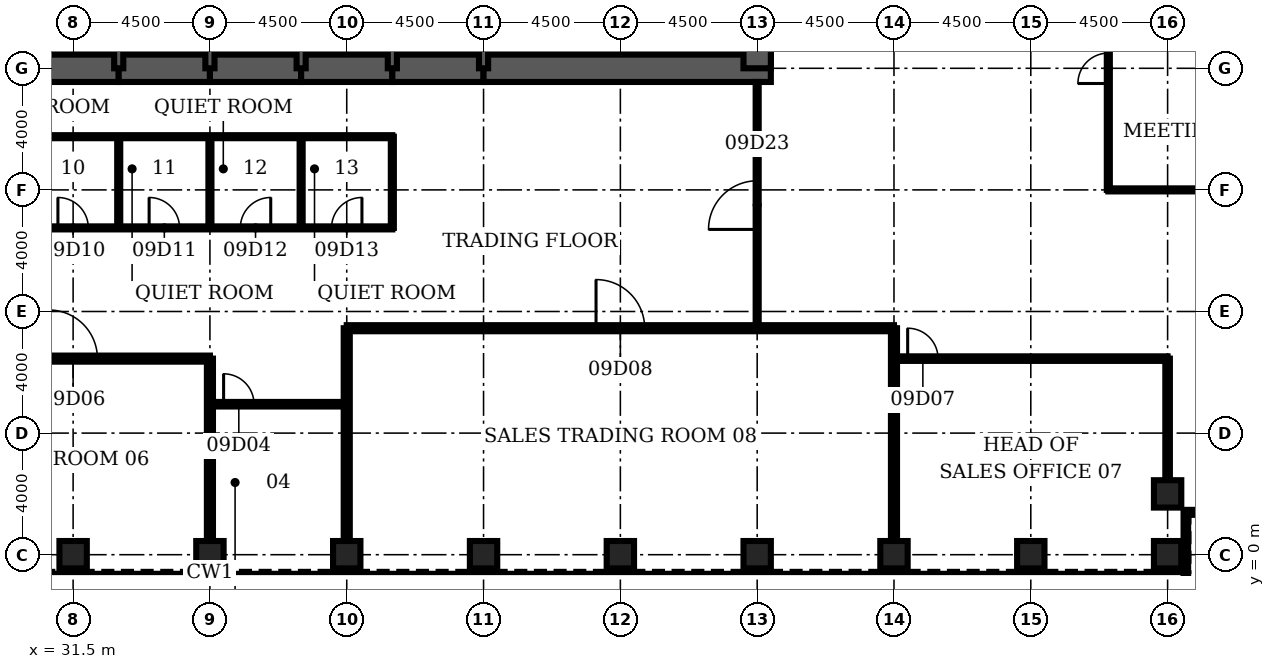
"""IFC4 building model, lengths in metres.
Left out: names, types, materials, properties, quantities, classifications, styles, units other than length and angle.
Written with IfcOpenShell. Run it as: python <this file> out.ifc"""

import sys

from ifc_helpers import new_model, si_unit, direction, frame, frame_2d, origin, origin_2d, place, context, subcontext, project, spatial, rectangle, hollow_rectangle, extrude, element, fill, save


model = new_model("IFC4")
c1 = context("Model", 3, precision=1e-05, world=origin(), true_north=direction((0.0, 1.0)))
c2 = subcontext(c1, "Body", "Model", "MODEL_VIEW")
j1 = project(units=[si_unit("LENGTHUNIT", "METRE"), si_unit("PLANEANGLEUNIT", "RADIAN")], contexts=[c1])
p1 = place(None, origin())
s1 = spatial("IfcSite", under=j1, at=p1, CompositionType="ELEMENT")
p2 = place(p1, origin())
s2 = spatial("IfcBuilding", under=s1, at=p2, CompositionType="ELEMENT")
p3 = place(p2, frame((0.0, 0.0, 45.5)))
s3 = spatial("IfcBuildingStorey", under=s2, at=p3, CompositionType="ELEMENT", Elevation=45.5)
for number, where, z_axis, x_axis in (
    (1, (31.5, 0.0, 0.0), (0.0, 0.0, 1.0), (0.0, 1.0, 0.0)),
    (2, (36.0, 0.0, 0.0), (0.0, 0.0, 1.0), (0.0, 1.0, 0.0)),
    (3, (40.5, 0.0, 0.0), (0.0, 0.0, 1.0), (0.0, 1.0, 0.0)),
    (4, (45.0, 0.0, 0.0), (0.0, 0.0, 1.0), (0.0, 1.0, 0.0)),
    (5, (49.5, 0.0, 0.0), (0.0, 0.0, 1.0), (0.0, 1.0, 0.0)),
    (6, (54.0, 0.0, 0.0), (0.0, 0.0, 1.0), (0.0, 1.0, 0.0)),
    (7, (58.5, 0.0, 0.0), (0.0, 0.0, 1.0), (0.0, 1.0, 0.0)),
    (8, (63.0, 0.0, 0.0), (0.0, 0.0, 1.0), (0.0, 1.0, 0.0)),
    (9, (67.5, 0.0, 0.0), (0.0, 0.0, 1.0), (0.0, 1.0, 0.0)),
    (10, (67.5, 2.0, 0.0), (0.0, 0.0, 1.0), (0.0, 1.0, 0.0)),
):
    element("IfcColumn", number, at=place(p3, frame(where, z_axis=z_axis, x_axis=x_axis)), inside=s3, PredefinedType="COLUMN", context=c2, shape_type="SweptSolid", body=[
        extrude(hollow_rectangle(XDim=0.9, YDim=0.9, WallThickness=0.12, at=origin_2d()), origin(), (0.0, 0.0, 1.0), 4.5),
    ])
for number, where, z_axis, x_axis in (
    (11, (30.0, 16.0, 0.0), (0.0, 0.0, 1.0), (1.0, 0.0, 0.0)),
    (12, (33.0, 16.0, 0.0), (0.0, 0.0, 1.0), (1.0, 0.0, 0.0)),
    (13, (36.0, 16.0, 0.0), (0.0, 0.0, 1.0), (1.0, 0.0, 0.0)),
    (14, (39.0, 16.0, 0.0), (0.0, 0.0, 1.0), (1.0, 0.0, 0.0)),
    (15, (42.0, 16.0, 0.0), (0.0, 0.0, 1.0), (1.0, 0.0, 0.0)),
):
    element("IfcWall", number, at=place(p3, frame(where, z_axis=z_axis, x_axis=x_axis)), inside=s3, PredefinedType="SHEAR", context=c2, shape_type="SweptSolid", body=[
        extrude(rectangle(XDim=3.0, YDim=0.9, at=frame_2d((1.5, 0.0))), origin(), (0.0, 0.0, 1.0), 4.5),
    ])
p4 = place(p3, frame((45.0, 16.0, 0.0), z_axis=(0.0, 0.0, 1.0), x_axis=(1.0, 0.0, 0.0)))
e16 = element("IfcWall", 16, at=p4, inside=s3, PredefinedType="SHEAR", context=c2, shape_type="SweptSolid", body=[
    extrude(rectangle(XDim=9.45, YDim=0.9, at=frame_2d((4.725, 0.0))), origin(), (0.0, 0.0, 1.0), 4.5),
])
p5 = place(p3, frame((54.0, 16.0, 0.0), z_axis=(0.0, 0.0, 1.0), x_axis=(0.0, 1.0, 0.0)))
e17 = element("IfcWall", 17, at=p5, inside=s3, PredefinedType="SHEAR", context=c2, shape_type="SweptSolid", body=[
    extrude(rectangle(XDim=3.2, YDim=0.9, at=frame_2d((1.6, 0.0))), origin(), (0.0, 0.0, 1.0), 4.5),
])
for number, where, z_axis, x_axis in (
    (18, (33.0, 16.0, 0.0), (0.0, 0.0, 1.0), (0.0, 1.0, 0.0)),
    (19, (36.0, 16.0, 0.0), (0.0, 0.0, 1.0), (0.0, 1.0, 0.0)),
    (20, (39.0, 16.0, 0.0), (0.0, 0.0, 1.0), (0.0, 1.0, 0.0)),
    (21, (42.0, 16.0, 0.0), (0.0, 0.0, 1.0), (0.0, 1.0, 0.0)),
    (22, (45.0, 16.0, 0.0), (0.0, 0.0, 1.0), (0.0, 1.0, 0.0)),
):
    element("IfcWall", number, at=place(p3, frame(where, z_axis=z_axis, x_axis=x_axis)), inside=s3, PredefinedType="SOLIDWALL", context=c2, shape_type="SweptSolid", body=[
        extrude(rectangle(XDim=3.2, YDim=0.3, at=frame_2d((1.6, 0.0))), origin(), (0.0, 0.0, 1.0), 4.5),
    ])
p6 = place(p3, frame((36.0, 4.95, 0.0), z_axis=(0.0, 0.0, 1.0), x_axis=(1.0, 0.0, 0.0)))
e23 = element("IfcWall", 23, at=p6, inside=s3, PredefinedType="PARTITIONING", context=c2, shape_type="SweptSolid", body=[
    extrude(rectangle(XDim=4.5, YDim=0.15, at=frame_2d((2.25, 0.0))), origin(), (0.0, 0.0, 1.0), 3.0),
])
p7 = place(p6, frame((0.45, 0.0, 0.0)))
e24 = element("IfcOpeningElement", 24, at=p7, cuts=e23, PredefinedType="OPENING", context=c2, shape_type="SweptSolid", body=[
    extrude(rectangle(XDim=1.0, YDim=2.1, at=frame_2d((0.5, 1.05))), frame((0.0, 0.085, 0.0), z_axis=(0.0, -1.0, 0.0), x_axis=(1.0, 0.0, 0.0)), (0.0, 0.0, 1.0), 0.17),
])
p8 = place(p3, frame((27.0, 6.45, 0.0), z_axis=(0.0, 0.0, 1.0), x_axis=(1.0, 0.0, 0.0)))
e25 = element("IfcWall", 25, at=p8, inside=s3, PredefinedType="PARTITIONING", context=c2, shape_type="SweptSolid", body=[
    extrude(rectangle(XDim=9.0, YDim=0.2, at=frame_2d((4.5, 0.0))), origin(), (0.0, 0.0, 1.0), 3.0),
])
p9 = place(p8, frame((3.7, 0.0, 0.0)))
e26 = element("IfcOpeningElement", 26, at=p9, cuts=e25, PredefinedType="OPENING", context=c2, shape_type="SweptSolid", body=[
    extrude(rectangle(XDim=1.6, YDim=2.1, at=frame_2d((0.8, 1.05))), frame((0.0, 0.11, 0.0), z_axis=(0.0, -1.0, 0.0), x_axis=(1.0, 0.0, 0.0)), (0.0, 0.0, 1.0), 0.22),
])
p10 = place(p3, frame((58.5, 6.45, 0.0), z_axis=(0.0, 0.0, 1.0), x_axis=(1.0, 0.0, 0.0)))
e27 = element("IfcWall", 27, at=p10, inside=s3, PredefinedType="PARTITIONING", context=c2, shape_type="SweptSolid", body=[
    extrude(rectangle(XDim=9.0, YDim=0.15, at=frame_2d((4.5, 0.0))), origin(), (0.0, 0.0, 1.0), 3.0),
])
p11 = place(p10, frame((0.45, 0.0, 0.0)))
e28 = element("IfcOpeningElement", 28, at=p11, cuts=e27, PredefinedType="OPENING", context=c2, shape_type="SweptSolid", body=[
    extrude(rectangle(XDim=1.0, YDim=2.1, at=frame_2d((0.5, 1.05))), frame((0.0, 0.085, 0.0), z_axis=(0.0, -1.0, 0.0), x_axis=(1.0, 0.0, 0.0)), (0.0, 0.0, 1.0), 0.17),
])
p12 = place(p3, frame((40.5, 7.45, 0.0), z_axis=(0.0, 0.0, 1.0), x_axis=(1.0, 0.0, 0.0)))
e29 = element("IfcWall", 29, at=p12, inside=s3, PredefinedType="PARTITIONING", context=c2, shape_type="SweptSolid", body=[
    extrude(rectangle(XDim=18.0, YDim=0.2, at=frame_2d((9.0, 0.0))), origin(), (0.0, 0.0, 1.0), 3.0),
])
p13 = place(p12, frame((8.2, 0.0, 0.0)))
e30 = element("IfcOpeningElement", 30, at=p13, cuts=e29, PredefinedType="OPENING", context=c2, shape_type="SweptSolid", body=[
    extrude(rectangle(XDim=1.6, YDim=2.1, at=frame_2d((0.8, 1.05))), frame((0.0, 0.11, 0.0), z_axis=(0.0, -1.0, 0.0), x_axis=(1.0, 0.0, 0.0)), (0.0, 0.0, 1.0), 0.22),
])
p14 = place(p3, frame((30.0, 10.75, 0.0), z_axis=(0.0, 0.0, 1.0), x_axis=(1.0, 0.0, 0.0)))
e31 = element("IfcWall", 31, at=p14, inside=s3, PredefinedType="PARTITIONING", context=c2, shape_type="SweptSolid", body=[
    extrude(rectangle(XDim=12.0, YDim=0.1, at=frame_2d((6.0, 0.0))), origin(), (0.0, 0.0, 1.0), 3.0),
])
p15 = place(p14, frame((1.0, 0.0, 0.0)))
e32 = element("IfcOpeningElement", 32, at=p15, cuts=e31, PredefinedType="OPENING", context=c2, shape_type="SweptSolid", body=[
    extrude(rectangle(XDim=1.0, YDim=2.1, at=frame_2d((0.5, 1.05))), frame((0.0, 0.06, 0.0), z_axis=(0.0, -1.0, 0.0), x_axis=(1.0, 0.0, 0.0)), (0.0, 0.0, 1.0), 0.12),
])
p16 = place(p14, frame((4.0, 0.0, 0.0)))
e33 = element("IfcOpeningElement", 33, at=p16, cuts=e31, PredefinedType="OPENING", context=c2, shape_type="SweptSolid", body=[
    extrude(rectangle(XDim=1.0, YDim=2.1, at=frame_2d((0.5, 1.05))), frame((0.0, 0.06, 0.0), z_axis=(0.0, -1.0, 0.0), x_axis=(1.0, 0.0, 0.0)), (0.0, 0.0, 1.0), 0.12),
])
p17 = place(p14, frame((7.0, 0.0, 0.0)))
e34 = element("IfcOpeningElement", 34, at=p17, cuts=e31, PredefinedType="OPENING", context=c2, shape_type="SweptSolid", body=[
    extrude(rectangle(XDim=1.0, YDim=2.1, at=frame_2d((0.5, 1.05))), frame((0.0, 0.06, 0.0), z_axis=(0.0, -1.0, 0.0), x_axis=(1.0, 0.0, 0.0)), (0.0, 0.0, 1.0), 0.12),
])
p18 = place(p14, frame((10.0, 0.0, 0.0)))
e35 = element("IfcOpeningElement", 35, at=p18, cuts=e31, PredefinedType="OPENING", context=c2, shape_type="SweptSolid", body=[
    extrude(rectangle(XDim=1.0, YDim=2.1, at=frame_2d((0.5, 1.05))), frame((0.0, 0.06, 0.0), z_axis=(0.0, -1.0, 0.0), x_axis=(1.0, 0.0, 0.0)), (0.0, 0.0, 1.0), 0.12),
])
p19 = place(p3, frame((65.55, 12.0, 0.0), z_axis=(0.0, 0.0, 1.0), x_axis=(1.0, 0.0, 0.0)))
e36 = element("IfcWall", 36, at=p19, inside=s3, PredefinedType="PARTITIONING", context=c2, shape_type="SweptSolid", body=[
    extrude(rectangle(XDim=6.0, YDim=0.1, at=frame_2d((3.0, 0.0))), origin(), (0.0, 0.0, 1.0), 3.0),
])
p20 = place(p3, frame((30.0, 13.75, 0.0), z_axis=(0.0, 0.0, 1.0), x_axis=(1.0, 0.0, 0.0)))
e37 = element("IfcWall", 37, at=p20, inside=s3, PredefinedType="PARTITIONING", context=c2, shape_type="SweptSolid", body=[
    extrude(rectangle(XDim=12.0, YDim=0.1, at=frame_2d((6.0, 0.0))), origin(), (0.0, 0.0, 1.0), 3.0),
])
p21 = place(p3, frame((33.0, 10.75, 0.0), z_axis=(0.0, 0.0, 1.0), x_axis=(0.0, 1.0, 0.0)))
e38 = element("IfcWall", 38, at=p21, inside=s3, PredefinedType="PARTITIONING", context=c2, shape_type="SweptSolid", body=[
    extrude(rectangle(XDim=3.0, YDim=0.1, at=frame_2d((1.5, 0.0))), origin(), (0.0, 0.0, 1.0), 3.0),
])
p22 = place(p3, frame((36.0, 0.45, 0.0), z_axis=(0.0, 0.0, 1.0), x_axis=(0.0, 1.0, 0.0)))
e39 = element("IfcWall", 39, at=p22, inside=s3, PredefinedType="PARTITIONING", context=c2, shape_type="SweptSolid", body=[
    extrude(rectangle(XDim=6.0, YDim=0.2, at=frame_2d((3.0, 0.0))), origin(), (0.0, 0.0, 1.0), 3.0),
])
for number, where, z_axis, x_axis in (
    (40, (36.0, 10.75, 0.0), (0.0, 0.0, 1.0), (0.0, 1.0, 0.0)),
    (41, (39.0, 10.75, 0.0), (0.0, 0.0, 1.0), (0.0, 1.0, 0.0)),
):
    element("IfcWall", number, at=place(p3, frame(where, z_axis=z_axis, x_axis=x_axis)), inside=s3, PredefinedType="PARTITIONING", context=c2, shape_type="SweptSolid", body=[
        extrude(rectangle(XDim=3.0, YDim=0.1, at=frame_2d((1.5, 0.0))), origin(), (0.0, 0.0, 1.0), 3.0),
    ])
p23 = place(p3, frame((40.5, 0.45, 0.0), z_axis=(0.0, 0.0, 1.0), x_axis=(0.0, 1.0, 0.0)))
e42 = element("IfcWall", 42, at=p23, inside=s3, PredefinedType="PARTITIONING", context=c2, shape_type="SweptSolid", body=[
    extrude(rectangle(XDim=7.0, YDim=0.2, at=frame_2d((3.5, 0.0))), origin(), (0.0, 0.0, 1.0), 3.0),
])
p24 = place(p3, frame((42.0, 10.75, 0.0), z_axis=(0.0, 0.0, 1.0), x_axis=(0.0, 1.0, 0.0)))
e43 = element("IfcWall", 43, at=p24, inside=s3, PredefinedType="PARTITIONING", context=c2, shape_type="SweptSolid", body=[
    extrude(rectangle(XDim=3.0, YDim=0.1, at=frame_2d((1.5, 0.0))), origin(), (0.0, 0.0, 1.0), 3.0),
])
p25 = place(p3, frame((54.0, 7.45, 0.0), z_axis=(0.0, 0.0, 1.0), x_axis=(0.0, 1.0, 0.0)))
e44 = element("IfcWall", 44, at=p25, inside=s3, PredefinedType="PARTITIONING", context=c2, shape_type="SweptSolid", body=[
    extrude(rectangle(XDim=8.1, YDim=0.1, at=frame_2d((4.05, 0.0))), origin(), (0.0, 0.0, 1.0), 3.0),
])
p26 = place(p25, frame((3.25, 0.0, 0.0)))
e45 = element("IfcOpeningElement", 45, at=p26, cuts=e44, PredefinedType="OPENING", context=c2, shape_type="SweptSolid", body=[
    extrude(rectangle(XDim=1.6, YDim=2.1, at=frame_2d((0.8, 1.05))), frame((0.0, 0.06, 0.0), z_axis=(0.0, -1.0, 0.0), x_axis=(1.0, 0.0, 0.0)), (0.0, 0.0, 1.0), 0.12),
])
p27 = place(p3, frame((58.5, 0.45, 0.0), z_axis=(0.0, 0.0, 1.0), x_axis=(0.0, 1.0, 0.0)))
e46 = element("IfcWall", 46, at=p27, inside=s3, PredefinedType="PARTITIONING", context=c2, shape_type="SweptSolid", body=[
    extrude(rectangle(XDim=7.0, YDim=0.2, at=frame_2d((3.5, 0.0))), origin(), (0.0, 0.0, 1.0), 3.0),
])
p28 = place(p3, frame((65.55, 12.0, 0.0), z_axis=(0.0, 0.0, 1.0), x_axis=(0.0, 1.0, 0.0)))
e47 = element("IfcWall", 47, at=p28, inside=s3, PredefinedType="PARTITIONING", context=c2, shape_type="SweptSolid", body=[
    extrude(rectangle(XDim=8.0, YDim=0.1, at=frame_2d((4.0, 0.0))), origin(), (0.0, 0.0, 1.0), 3.0),
])
p29 = place(p28, frame((3.5, 0.0, 0.0)))
e48 = element("IfcOpeningElement", 48, at=p29, cuts=e47, PredefinedType="OPENING", context=c2, shape_type="SweptSolid", body=[
    extrude(rectangle(XDim=1.0, YDim=2.1, at=frame_2d((0.5, 1.05))), frame((0.0, 0.06, 0.0), z_axis=(0.0, -1.0, 0.0), x_axis=(1.0, 0.0, 0.0)), (0.0, 0.0, 1.0), 0.12),
])
p30 = place(p3, frame((67.5, 2.45, 0.0), z_axis=(0.0, 0.0, 1.0), x_axis=(0.0, 1.0, 0.0)))
e49 = element("IfcWall", 49, at=p30, inside=s3, PredefinedType="PARTITIONING", context=c2, shape_type="SweptSolid", body=[
    extrude(rectangle(XDim=4.0, YDim=0.15, at=frame_2d((2.0, 0.0))), origin(), (0.0, 0.0, 1.0), 3.0),
])
p31 = place(p3, frame((68.1, -0.6, 0.0), z_axis=(0.0, 0.0, 1.0), x_axis=(0.0, 1.0, 0.0)))
e50 = element("IfcWall", 50, at=p31, inside=s3, PredefinedType="ELEMENTEDWALL", context=c2, shape_type="SweptSolid", body=[
    extrude(rectangle(XDim=2.0, YDim=0.15, at=frame_2d((1.0, 0.0))), origin(), (0.0, 0.0, 1.0), 4.32),
])
p32 = place(p3, frame((68.1, 1.4, 0.0), z_axis=(0.0, 0.0, 1.0), x_axis=(1.0, 0.0, 0.0)))
e51 = element("IfcWall", 51, at=p32, inside=s3, PredefinedType="ELEMENTEDWALL", context=c2, shape_type="SweptSolid", body=[
    extrude(rectangle(XDim=2.25, YDim=0.15, at=frame_2d((1.125, 0.0))), origin(), (0.0, 0.0, 1.0), 4.32),
])
p33 = place(p7, origin())
e52 = element("IfcDoor", 52, at=p33, inside=s3, OperationType="SINGLE_SWING_LEFT", PredefinedType="DOOR", context=c2, shape_type="SweptSolid", body=[
    extrude(rectangle(XDim=1.0, YDim=2.1, at=frame_2d((0.5, 1.05))), frame((0.0, 0.025, 0.0), z_axis=(0.0, -1.0, 0.0), x_axis=(1.0, 0.0, 0.0)), (0.0, 0.0, 1.0), 0.05),
])
fill(e24, e52)
p34 = place(p9, origin())
e53 = element("IfcDoor", 53, at=p34, inside=s3, OperationType="SINGLE_SWING_LEFT", PredefinedType="DOOR", context=c2, shape_type="SweptSolid", body=[
    extrude(rectangle(XDim=1.6, YDim=2.1, at=frame_2d((0.8, 1.05))), frame((0.0, 0.025, 0.0), z_axis=(0.0, -1.0, 0.0), x_axis=(1.0, 0.0, 0.0)), (0.0, 0.0, 1.0), 0.05),
])
fill(e26, e53)
p35 = place(p11, origin())
e54 = element("IfcDoor", 54, at=p35, inside=s3, OperationType="SINGLE_SWING_LEFT", PredefinedType="DOOR", context=c2, shape_type="SweptSolid", body=[
    extrude(rectangle(XDim=1.0, YDim=2.1, at=frame_2d((0.5, 1.05))), frame((0.0, 0.025, 0.0), z_axis=(0.0, -1.0, 0.0), x_axis=(1.0, 0.0, 0.0)), (0.0, 0.0, 1.0), 0.05),
])
fill(e28, e54)
p36 = place(p13, origin())
e55 = element("IfcDoor", 55, at=p36, inside=s3, OperationType="SINGLE_SWING_LEFT", PredefinedType="DOOR", context=c2, shape_type="SweptSolid", body=[
    extrude(rectangle(XDim=1.6, YDim=2.1, at=frame_2d((0.8, 1.05))), frame((0.0, 0.025, 0.0), z_axis=(0.0, -1.0, 0.0), x_axis=(1.0, 0.0, 0.0)), (0.0, 0.0, 1.0), 0.05),
])
fill(e30, e55)
p37 = place(p15, origin())
e56 = element("IfcDoor", 56, at=p37, inside=s3, OperationType="SINGLE_SWING_LEFT", PredefinedType="DOOR", context=c2, shape_type="SweptSolid", body=[
    extrude(rectangle(XDim=1.0, YDim=2.1, at=frame_2d((0.5, 1.05))), frame((0.0, 0.025, 0.0), z_axis=(0.0, -1.0, 0.0), x_axis=(1.0, 0.0, 0.0)), (0.0, 0.0, 1.0), 0.05),
])
fill(e32, e56)
p38 = place(p16, origin())
e57 = element("IfcDoor", 57, at=p38, inside=s3, OperationType="SINGLE_SWING_LEFT", PredefinedType="DOOR", context=c2, shape_type="SweptSolid", body=[
    extrude(rectangle(XDim=1.0, YDim=2.1, at=frame_2d((0.5, 1.05))), frame((0.0, 0.025, 0.0), z_axis=(0.0, -1.0, 0.0), x_axis=(1.0, 0.0, 0.0)), (0.0, 0.0, 1.0), 0.05),
])
fill(e33, e57)
p39 = place(p17, origin())
e58 = element("IfcDoor", 58, at=p39, inside=s3, OperationType="SINGLE_SWING_RIGHT", PredefinedType="DOOR", context=c2, shape_type="SweptSolid", body=[
    extrude(rectangle(XDim=1.0, YDim=2.1, at=frame_2d((0.5, 1.05))), frame((0.0, 0.025, 0.0), z_axis=(0.0, -1.0, 0.0), x_axis=(1.0, 0.0, 0.0)), (0.0, 0.0, 1.0), 0.05),
])
fill(e34, e58)
p40 = place(p18, origin())
e59 = element("IfcDoor", 59, at=p40, inside=s3, OperationType="SINGLE_SWING_RIGHT", PredefinedType="DOOR", context=c2, shape_type="SweptSolid", body=[
    extrude(rectangle(XDim=1.0, YDim=2.1, at=frame_2d((0.5, 1.05))), frame((0.0, 0.025, 0.0), z_axis=(0.0, -1.0, 0.0), x_axis=(1.0, 0.0, 0.0)), (0.0, 0.0, 1.0), 0.05),
])
fill(e35, e59)
p41 = place(p29, origin())
e60 = element("IfcDoor", 60, at=p41, inside=s3, OperationType="SINGLE_SWING_LEFT", PredefinedType="DOOR", context=c2, shape_type="SweptSolid", body=[
    extrude(rectangle(XDim=1.0, YDim=2.1, at=frame_2d((0.5, 1.05))), frame((0.0, 0.025, 0.0), z_axis=(0.0, -1.0, 0.0), x_axis=(1.0, 0.0, 0.0)), (0.0, 0.0, 1.0), 0.05),
])
fill(e48, e60)
p42 = place(p26, origin())
e61 = element("IfcDoor", 61, at=p42, inside=s3, OperationType="SINGLE_SWING_LEFT", PredefinedType="DOOR", context=c2, shape_type="SweptSolid", body=[
    extrude(rectangle(XDim=1.6, YDim=2.1, at=frame_2d((0.8, 1.05))), frame((0.0, 0.025, 0.0), z_axis=(0.0, -1.0, 0.0), x_axis=(1.0, 0.0, 0.0)), (0.0, 0.0, 1.0), 0.05),
])
fill(e45, e61)
save(model, sys.argv[1])
